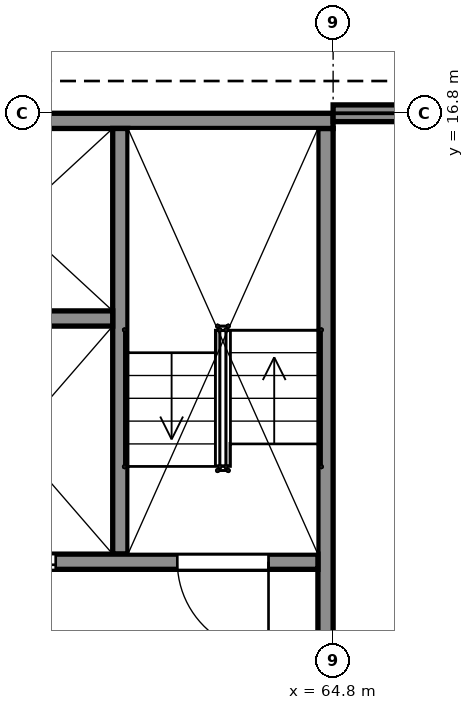
"""IFC4 building model, lengths in metres.
Left out: names, types, materials, properties, quantities, classifications, styles, units other than length and angle.
Written with IfcOpenShell. Run it as: python <this file> out.ifc"""

import sys

from ifc_helpers import new_model, si_unit, direction, frame, frame_2d, origin, place, context, subcontext, project, spatial, rectangle, extrude, element, fill, save


model = new_model("IFC4")
c1 = context("Model", 3, precision=1e-05, world=origin(), true_north=direction((0.0, 1.0)))
c2 = subcontext(c1, "Body", "Model", "MODEL_VIEW")
j1 = project(units=[si_unit("LENGTHUNIT", "METRE"), si_unit("PLANEANGLEUNIT", "RADIAN")], contexts=[c1])
p1 = place(None, origin())
s1 = spatial("IfcSite", under=j1, at=p1, CompositionType="ELEMENT")
p2 = place(p1, origin())
s2 = spatial("IfcBuilding", under=s1, at=p2, CompositionType="ELEMENT")
p3 = place(p2, frame((0.0, 0.0, 20.0)))
s3 = spatial("IfcBuildingStorey", under=s2, at=p3, CompositionType="ELEMENT", Elevation=20.0)
p4 = place(p3, frame((56.4, 16.7, 0.0), z_axis=(0.0, 0.0, 1.0), x_axis=(1.0, 0.0, 0.0)))
e1 = element("IfcWall", 1, at=p4, inside=s3, PredefinedType="SHEAR", context=c2, shape_type="SweptSolid", body=[
    extrude(rectangle(XDim=8.4, YDim=0.2, at=frame_2d((4.2, 0.0))), origin(), (0.0, 0.0, 1.0), 5.0),
])
p5 = place(p3, frame((64.7, 8.6, 0.0), z_axis=(0.0, 0.0, 1.0), x_axis=(0.0, 1.0, 0.0)))
e2 = element("IfcWall", 2, at=p5, inside=s3, PredefinedType="SHEAR", context=c2, shape_type="SweptSolid", body=[
    extrude(rectangle(XDim=8.0, YDim=0.2, at=frame_2d((4.0, 0.0))), origin(), (0.0, 0.0, 1.0), 5.0),
])
p6 = place(p3, frame((56.6, 10.9, 0.0), z_axis=(0.0, 0.0, 1.0), x_axis=(1.0, 0.0, 0.0)))
e3 = element("IfcWall", 3, at=p6, inside=s3, PredefinedType="SHEAR", context=c2, shape_type="SweptSolid", body=[
    extrude(rectangle(XDim=8.0, YDim=0.2, at=frame_2d((4.0, 0.0))), origin(), (0.0, 0.0, 1.0), 5.0),
])
p7 = place(p6, frame((0.65, 0.0, 0.0)))
e4 = element("IfcOpeningElement", 4, at=p7, cuts=e3, PredefinedType="OPENING", context=c2, shape_type="SweptSolid", body=[
    extrude(rectangle(XDim=1.2, YDim=2.1, at=frame_2d((0.6, 1.05))), frame((0.0, 0.11, 0.0), z_axis=(0.0, -1.0, 0.0), x_axis=(1.0, 0.0, 0.0)), (0.0, 0.0, 1.0), 0.22),
])
p8 = place(p6, frame((6.15, 0.0, 0.0)))
e5 = element("IfcOpeningElement", 5, at=p8, cuts=e3, PredefinedType="OPENING", context=c2, shape_type="SweptSolid", body=[
    extrude(rectangle(XDim=1.2, YDim=2.1, at=frame_2d((0.6, 1.05))), frame((0.0, 0.11, 0.0), z_axis=(0.0, -1.0, 0.0), x_axis=(1.0, 0.0, 0.0)), (0.0, 0.0, 1.0), 0.22),
])
p9 = place(p6, frame((3.45, 0.0, 0.0)))
e6 = element("IfcOpeningElement", 6, at=p9, cuts=e3, PredefinedType="OPENING", context=c2, shape_type="SweptSolid", body=[
    extrude(rectangle(XDim=1.1, YDim=2.1, at=frame_2d((0.55, 1.05))), frame((0.0, 0.11, 0.0), z_axis=(0.0, -1.0, 0.0), x_axis=(1.0, 0.0, 0.0)), (0.0, 0.0, 1.0), 0.22),
])
p10 = place(p3, frame((62.0, 11.0, 0.0), z_axis=(0.0, 0.0, 1.0), x_axis=(0.0, 1.0, 0.0)))
e7 = element("IfcWall", 7, at=p10, inside=s3, PredefinedType="SHEAR", context=c2, shape_type="SweptSolid", body=[
    extrude(rectangle(XDim=5.6, YDim=0.2, at=frame_2d((2.8, 0.0))), origin(), (0.0, 0.0, 1.0), 5.0),
])
p11 = place(p3, frame((59.3, 14.1, 0.0), z_axis=(0.0, 0.0, 1.0), x_axis=(1.0, 0.0, 0.0)))
e8 = element("IfcWall", 8, at=p11, inside=s3, PredefinedType="SHEAR", context=c2, shape_type="SweptSolid", body=[
    extrude(rectangle(XDim=2.6, YDim=0.2, at=frame_2d((1.3, 0.0))), origin(), (0.0, 0.0, 1.0), 5.0),
])
p12 = place(p3, frame((64.8, 16.8, 0.0), z_axis=(0.0, 0.0, 1.0), x_axis=(1.0, 0.0, 0.0)))
e9 = element("IfcWall", 9, at=p12, inside=s3, PredefinedType="SOLIDWALL", context=c2, shape_type="SweptSolid", body=[
    extrude(rectangle(XDim=8.05, YDim=0.22, at=frame_2d((4.025, 0.0))), origin(), (0.0, 0.0, 1.0), 3.94),
])
p13 = place(p12, frame((2.225, 0.0, 0.9)))
e10 = element("IfcOpeningElement", 10, at=p13, cuts=e9, PredefinedType="OPENING", context=c2, shape_type="SweptSolid", body=[
    extrude(rectangle(XDim=3.6, YDim=1.5, at=frame_2d((1.8, 0.75))), frame((0.0, 0.12, 0.0), z_axis=(0.0, -1.0, 0.0), x_axis=(1.0, 0.0, 0.0)), (0.0, 0.0, 1.0), 0.24),
])
p14 = place(p8, origin())
e11 = element("IfcDoor", 11, at=p14, inside=s3, OperationType="SINGLE_SWING_RIGHT", PredefinedType="DOOR", context=c2, shape_type="SweptSolid", body=[
    extrude(rectangle(XDim=1.2, YDim=2.1, at=frame_2d((0.6, 1.05))), frame((0.0, 0.025, 0.0), z_axis=(0.0, -1.0, 0.0), x_axis=(1.0, 0.0, 0.0)), (0.0, 0.0, 1.0), 0.05),
])
fill(e5, e11)
p15 = place(p9, origin())
e12 = element("IfcDoor", 12, at=p15, inside=s3, OperationType="DOUBLE_DOOR_SLIDING", PredefinedType="DOOR", context=c2, shape_type="SweptSolid", body=[
    extrude(rectangle(XDim=1.1, YDim=2.1, at=frame_2d((0.55, 1.05))), frame((0.0, 0.025, 0.0), z_axis=(0.0, -1.0, 0.0), x_axis=(1.0, 0.0, 0.0)), (0.0, 0.0, 1.0), 0.05),
])
fill(e6, e12)
save(model, sys.argv[1])
